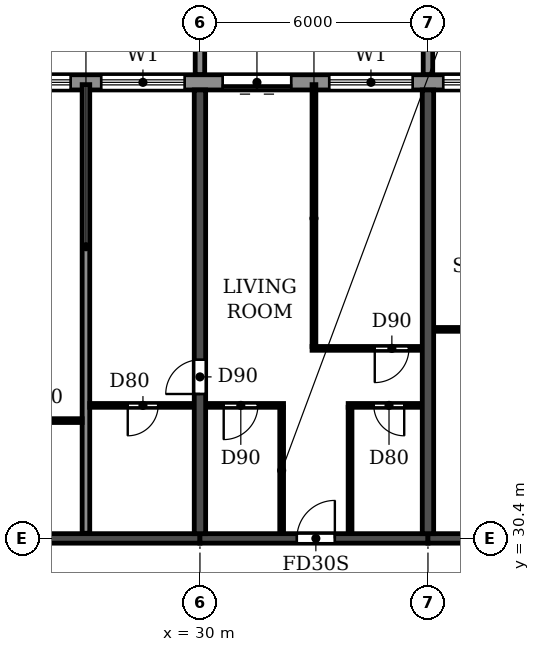
"""IFC4 building model, lengths in metres.
Left out: names, types, materials, properties, quantities, classifications, styles, units other than length and angle.
Written with IfcOpenShell. Run it as: python <this file> out.ifc"""

import sys

from ifc_helpers import new_model, si_unit, direction, frame, frame_2d, origin, place, context, subcontext, project, spatial, polyline, rectangle, outline, extrude, source, transform, mapped, element, fill, save


model = new_model("IFC4")
c1 = context("Model", 3, precision=1e-05, world=origin(), true_north=direction((0.0, 1.0)))
c2 = subcontext(c1, "Body", "Model", "MODEL_VIEW")
j1 = project(units=[si_unit("LENGTHUNIT", "METRE"), si_unit("PLANEANGLEUNIT", "RADIAN")], contexts=[c1])
p1 = place(None, origin())
s1 = spatial("IfcSite", under=j1, at=p1, CompositionType="ELEMENT")
p2 = place(p1, origin())
s2 = spatial("IfcBuilding", under=s1, at=p2, CompositionType="ELEMENT")
p3 = place(p2, frame((0.0, 0.0, 132.3)))
s3 = spatial("IfcBuildingStorey", under=s2, at=p3, CompositionType="ELEMENT", Elevation=132.3)
p4 = place(p3, frame((30.0, 30.525, 0.0), z_axis=(0.0, 0.0, 1.0), x_axis=(0.0, 1.0, 0.0)))
e1 = element("IfcWall", 1, at=p4, inside=s3, PredefinedType="SHEAR", context=c2, shape_type="SweptSolid", body=[
    extrude(rectangle(XDim=11.675, YDim=0.3, at=frame_2d((5.837, 0.0))), origin(), (0.0, 0.0, 1.0), 3.07),
])
p5 = place(p4, frame((3.675, 0.0, 0.0)))
e2 = element("IfcOpeningElement", 2, at=p5, cuts=e1, PredefinedType="OPENING", context=c2, shape_type="SweptSolid", body=[
    extrude(rectangle(XDim=0.9, YDim=2.1, at=frame_2d((0.45, 1.05))), frame((0.0, 0.16, 0.0), z_axis=(0.0, -1.0, 0.0), x_axis=(1.0, 0.0, 0.0)), (0.0, 0.0, 1.0), 0.32),
])
p6 = place(p3, frame((36.0, 30.525, 0.0), z_axis=(0.0, 0.0, 1.0), x_axis=(0.0, 1.0, 0.0)))
e3 = element("IfcWall", 3, at=p6, inside=s3, PredefinedType="SHEAR", context=c2, shape_type="SweptSolid", body=[
    extrude(rectangle(XDim=11.675, YDim=0.3, at=frame_2d((5.837, 0.0))), origin(), (0.0, 0.0, 1.0), 3.07),
])
p7 = place(p3, frame((24.0, 30.4, 0.0), z_axis=(0.0, 0.0, 1.0), x_axis=(1.0, 0.0, 0.0)))
e4 = element("IfcWall", 4, at=p7, inside=s3, PredefinedType="SHEAR", context=c2, shape_type="SweptSolid", body=[
    extrude(rectangle(XDim=6.0, YDim=0.25, at=frame_2d((3.0, 0.0))), origin(), (0.0, 0.0, 1.0), 2.47),
])
p8 = place(p3, frame((30.0, 30.4, 0.0), z_axis=(0.0, 0.0, 1.0), x_axis=(1.0, 0.0, 0.0)))
e5 = element("IfcWall", 5, at=p8, inside=s3, PredefinedType="SHEAR", context=c2, shape_type="SweptSolid", body=[
    extrude(rectangle(XDim=6.0, YDim=0.25, at=frame_2d((3.0, 0.0))), origin(), (0.0, 0.0, 1.0), 2.47),
])
p9 = place(p8, frame((2.55, 0.0, 0.0)))
e6 = element("IfcOpeningElement", 6, at=p9, cuts=e5, PredefinedType="OPENING", context=c2, shape_type="SweptSolid", body=[
    extrude(rectangle(XDim=1.0, YDim=2.1, at=frame_2d((0.5, 1.05))), frame((0.0, 0.135, 0.0), z_axis=(0.0, -1.0, 0.0), x_axis=(1.0, 0.0, 0.0)), (0.0, 0.0, 1.0), 0.27),
])
p10 = place(p3, frame((36.0, 30.4, 0.0), z_axis=(0.0, 0.0, 1.0), x_axis=(1.0, 0.0, 0.0)))
e7 = element("IfcWall", 7, at=p10, inside=s3, PredefinedType="SHEAR", context=c2, shape_type="SweptSolid", body=[
    extrude(rectangle(XDim=6.0, YDim=0.25, at=frame_2d((3.0, 0.0))), origin(), (0.0, 0.0, 1.0), 2.47),
])
p11 = place(p10, frame((2.45, 0.0, 0.0)))
e8 = element("IfcOpeningElement", 8, at=p11, cuts=e7, PredefinedType="OPENING", context=c2, shape_type="SweptSolid", body=[
    extrude(rectangle(XDim=1.0, YDim=2.1, at=frame_2d((0.5, 1.05))), frame((0.0, 0.135, 0.0), z_axis=(0.0, -1.0, 0.0), x_axis=(1.0, 0.0, 0.0)), (0.0, 0.0, 1.0), 0.27),
])
p12 = place(p3, frame((85.317, 42.4, 0.0), z_axis=(0.0, 0.0, 1.0), x_axis=(-1.0, 0.0, 0.0)))
e9 = element("IfcWall", 9, at=p12, inside=s3, PredefinedType="STANDARD", context=c2, shape_type="SweptSolid", body=[
    extrude(rectangle(XDim=68.634, YDim=0.4, at=frame_2d((34.317, 0.0))), origin(), (0.0, 0.0, 1.0), 3.07),
])
p13 = place(p12, frame((64.917, 0.0, 0.0)))
e10 = element("IfcOpeningElement", 10, at=p13, cuts=e9, PredefinedType="OPENING", context=c2, shape_type="SweptSolid", body=[
    extrude(rectangle(XDim=1.8, YDim=2.4, at=frame_2d((0.9, 1.2))), frame((0.0, 0.21, 0.0), z_axis=(0.0, -1.0, 0.0), x_axis=(1.0, 0.0, 0.0)), (0.0, 0.0, 1.0), 0.42),
])
p14 = place(p12, frame((61.717, 0.0, 0.9)))
e11 = element("IfcOpeningElement", 11, at=p14, cuts=e9, PredefinedType="OPENING", context=c2, shape_type="SweptSolid", body=[
    extrude(rectangle(XDim=2.2, YDim=1.5, at=frame_2d((1.1, 0.75))), frame((0.0, 0.21, 0.0), z_axis=(0.0, -1.0, 0.0), x_axis=(1.0, 0.0, 0.0)), (0.0, 0.0, 1.0), 0.42),
])
p15 = place(p12, frame((58.717, 0.0, 0.9)))
e12 = element("IfcOpeningElement", 12, at=p15, cuts=e9, PredefinedType="OPENING", context=c2, shape_type="SweptSolid", body=[
    extrude(rectangle(XDim=2.2, YDim=1.5, at=frame_2d((1.1, 0.75))), frame((0.0, 0.21, 0.0), z_axis=(0.0, -1.0, 0.0), x_axis=(1.0, 0.0, 0.0)), (0.0, 0.0, 1.0), 0.42),
])
p16 = place(p12, frame((55.717, 0.0, 0.9)))
e13 = element("IfcOpeningElement", 13, at=p16, cuts=e9, PredefinedType="OPENING", context=c2, shape_type="SweptSolid", body=[
    extrude(rectangle(XDim=2.2, YDim=1.5, at=frame_2d((1.1, 0.75))), frame((0.0, 0.21, 0.0), z_axis=(0.0, -1.0, 0.0), x_axis=(1.0, 0.0, 0.0)), (0.0, 0.0, 1.0), 0.42),
])
p17 = place(p12, frame((52.917, 0.0, 0.0)))
e14 = element("IfcOpeningElement", 14, at=p17, cuts=e9, PredefinedType="OPENING", context=c2, shape_type="SweptSolid", body=[
    extrude(rectangle(XDim=1.8, YDim=2.4, at=frame_2d((0.9, 1.2))), frame((0.0, 0.21, 0.0), z_axis=(0.0, -1.0, 0.0), x_axis=(1.0, 0.0, 0.0)), (0.0, 0.0, 1.0), 0.42),
])
p18 = place(p12, frame((49.717, 0.0, 0.9)))
e15 = element("IfcOpeningElement", 15, at=p18, cuts=e9, PredefinedType="OPENING", context=c2, shape_type="SweptSolid", body=[
    extrude(rectangle(XDim=2.2, YDim=1.5, at=frame_2d((1.1, 0.75))), frame((0.0, 0.21, 0.0), z_axis=(0.0, -1.0, 0.0), x_axis=(1.0, 0.0, 0.0)), (0.0, 0.0, 1.0), 0.42),
])
p19 = place(p12, frame((46.717, 0.0, 0.9)))
e16 = element("IfcOpeningElement", 16, at=p19, cuts=e9, PredefinedType="OPENING", context=c2, shape_type="SweptSolid", body=[
    extrude(rectangle(XDim=2.2, YDim=1.5, at=frame_2d((1.1, 0.75))), frame((0.0, 0.21, 0.0), z_axis=(0.0, -1.0, 0.0), x_axis=(1.0, 0.0, 0.0)), (0.0, 0.0, 1.0), 0.42),
])
p20 = place(p12, frame((43.917, 0.0, 0.0)))
e17 = element("IfcOpeningElement", 17, at=p20, cuts=e9, PredefinedType="OPENING", context=c2, shape_type="SweptSolid", body=[
    extrude(rectangle(XDim=1.8, YDim=2.4, at=frame_2d((0.9, 1.2))), frame((0.0, 0.21, 0.0), z_axis=(0.0, -1.0, 0.0), x_axis=(1.0, 0.0, 0.0)), (0.0, 0.0, 1.0), 0.42),
])
p21 = place(p12, frame((40.917, 0.0, 0.0)))
e18 = element("IfcOpeningElement", 18, at=p21, cuts=e9, PredefinedType="OPENING", context=c2, shape_type="SweptSolid", body=[
    extrude(rectangle(XDim=1.8, YDim=2.4, at=frame_2d((0.9, 1.2))), frame((0.0, 0.21, 0.0), z_axis=(0.0, -1.0, 0.0), x_axis=(1.0, 0.0, 0.0)), (0.0, 0.0, 1.0), 0.42),
])
p22 = place(p12, frame((37.717, 0.0, 0.9)))
e19 = element("IfcOpeningElement", 19, at=p22, cuts=e9, PredefinedType="OPENING", context=c2, shape_type="SweptSolid", body=[
    extrude(rectangle(XDim=2.2, YDim=1.5, at=frame_2d((1.1, 0.75))), frame((0.0, 0.21, 0.0), z_axis=(0.0, -1.0, 0.0), x_axis=(1.0, 0.0, 0.0)), (0.0, 0.0, 1.0), 0.42),
])
p23 = place(p12, frame((34.717, 0.0, 0.9)))
e20 = element("IfcOpeningElement", 20, at=p23, cuts=e9, PredefinedType="OPENING", context=c2, shape_type="SweptSolid", body=[
    extrude(rectangle(XDim=2.2, YDim=1.5, at=frame_2d((1.1, 0.75))), frame((0.0, 0.21, 0.0), z_axis=(0.0, -1.0, 0.0), x_axis=(1.0, 0.0, 0.0)), (0.0, 0.0, 1.0), 0.42),
])
p24 = place(p12, frame((31.717, 0.0, 0.9)))
e21 = element("IfcOpeningElement", 21, at=p24, cuts=e9, PredefinedType="OPENING", context=c2, shape_type="SweptSolid", body=[
    extrude(rectangle(XDim=2.2, YDim=1.5, at=frame_2d((1.1, 0.75))), frame((0.0, 0.21, 0.0), z_axis=(0.0, -1.0, 0.0), x_axis=(1.0, 0.0, 0.0)), (0.0, 0.0, 1.0), 0.42),
])
p25 = place(p12, frame((28.917, 0.0, 0.0)))
e22 = element("IfcOpeningElement", 22, at=p25, cuts=e9, PredefinedType="OPENING", context=c2, shape_type="SweptSolid", body=[
    extrude(rectangle(XDim=1.8, YDim=2.4, at=frame_2d((0.9, 1.2))), frame((0.0, 0.21, 0.0), z_axis=(0.0, -1.0, 0.0), x_axis=(1.0, 0.0, 0.0)), (0.0, 0.0, 1.0), 0.42),
])
p26 = place(p12, frame((25.717, 0.0, 0.9)))
e23 = element("IfcOpeningElement", 23, at=p26, cuts=e9, PredefinedType="OPENING", context=c2, shape_type="SweptSolid", body=[
    extrude(rectangle(XDim=2.2, YDim=1.5, at=frame_2d((1.1, 0.75))), frame((0.0, 0.21, 0.0), z_axis=(0.0, -1.0, 0.0), x_axis=(1.0, 0.0, 0.0)), (0.0, 0.0, 1.0), 0.42),
])
p27 = place(p12, frame((22.717, 0.0, 0.9)))
e24 = element("IfcOpeningElement", 24, at=p27, cuts=e9, PredefinedType="OPENING", context=c2, shape_type="SweptSolid", body=[
    extrude(rectangle(XDim=2.2, YDim=1.5, at=frame_2d((1.1, 0.75))), frame((0.0, 0.21, 0.0), z_axis=(0.0, -1.0, 0.0), x_axis=(1.0, 0.0, 0.0)), (0.0, 0.0, 1.0), 0.42),
])
p28 = place(p12, frame((19.717, 0.0, 0.9)))
e25 = element("IfcOpeningElement", 25, at=p28, cuts=e9, PredefinedType="OPENING", context=c2, shape_type="SweptSolid", body=[
    extrude(rectangle(XDim=2.2, YDim=1.5, at=frame_2d((1.1, 0.75))), frame((0.0, 0.21, 0.0), z_axis=(0.0, -1.0, 0.0), x_axis=(1.0, 0.0, 0.0)), (0.0, 0.0, 1.0), 0.42),
])
p29 = place(p12, frame((16.717, 0.0, 0.9)))
e26 = element("IfcOpeningElement", 26, at=p29, cuts=e9, PredefinedType="OPENING", context=c2, shape_type="SweptSolid", body=[
    extrude(rectangle(XDim=2.2, YDim=1.5, at=frame_2d((1.1, 0.75))), frame((0.0, 0.21, 0.0), z_axis=(0.0, -1.0, 0.0), x_axis=(1.0, 0.0, 0.0)), (0.0, 0.0, 1.0), 0.42),
])
p30 = place(p12, frame((13.917, 0.0, 0.0)))
e27 = element("IfcOpeningElement", 27, at=p30, cuts=e9, PredefinedType="OPENING", context=c2, shape_type="SweptSolid", body=[
    extrude(rectangle(XDim=1.8, YDim=2.4, at=frame_2d((0.9, 1.2))), frame((0.0, 0.21, 0.0), z_axis=(0.0, -1.0, 0.0), x_axis=(1.0, 0.0, 0.0)), (0.0, 0.0, 1.0), 0.42),
])
p31 = place(p12, frame((10.717, 0.0, 0.9)))
e28 = element("IfcOpeningElement", 28, at=p31, cuts=e9, PredefinedType="OPENING", context=c2, shape_type="SweptSolid", body=[
    extrude(rectangle(XDim=2.2, YDim=1.5, at=frame_2d((1.1, 0.75))), frame((0.0, 0.21, 0.0), z_axis=(0.0, -1.0, 0.0), x_axis=(1.0, 0.0, 0.0)), (0.0, 0.0, 1.0), 0.42),
])
p32 = place(p12, frame((7.917, 0.0, 0.0)))
e29 = element("IfcOpeningElement", 29, at=p32, cuts=e9, PredefinedType="OPENING", context=c2, shape_type="SweptSolid", body=[
    extrude(rectangle(XDim=1.8, YDim=2.4, at=frame_2d((0.9, 1.2))), frame((0.0, 0.21, 0.0), z_axis=(0.0, -1.0, 0.0), x_axis=(1.0, 0.0, 0.0)), (0.0, 0.0, 1.0), 0.42),
])
p33 = place(p12, frame((4.717, 0.0, 0.9)))
e30 = element("IfcOpeningElement", 30, at=p33, cuts=e9, PredefinedType="OPENING", context=c2, shape_type="SweptSolid", body=[
    extrude(rectangle(XDim=2.2, YDim=1.5, at=frame_2d((1.1, 0.75))), frame((0.0, 0.21, 0.0), z_axis=(0.0, -1.0, 0.0), x_axis=(1.0, 0.0, 0.0)), (0.0, 0.0, 1.0), 0.42),
])
p34 = place(p12, frame((1.917, 0.0, 0.0)))
e31 = element("IfcOpeningElement", 31, at=p34, cuts=e9, PredefinedType="OPENING", context=c2, shape_type="SweptSolid", body=[
    extrude(rectangle(XDim=1.8, YDim=2.4, at=frame_2d((0.9, 1.2))), frame((0.0, 0.21, 0.0), z_axis=(0.0, -1.0, 0.0), x_axis=(1.0, 0.0, 0.0)), (0.0, 0.0, 1.0), 0.42),
])
m1 = source(origin(), c2, "Body", "SweptSolid", [
    extrude(outline(polyline([(0.0, 0.0), (0.25, 0.0), (0.25, 3.1), (0.0, 3.1), (0.0, 0.0)])), origin(), (0.0, 0.0, 1.0), 3.1),
])
for number, where in (
    (32, (29.875, 42.6, 0.0)),
    (33, (35.875, 42.6, 0.0)),
):
    element("IfcWall", number, at=place(p3, frame(where)), inside=s3, PredefinedType="STANDARD", context=c2, shape_type="MappedRepresentation", body=[
        mapped(m1, transform((0.0, 0.0, 0.0))),
    ])
p35 = place(p3, frame((27.0, 30.535, 0.0), z_axis=(0.0, 0.0, 1.0), x_axis=(0.0, 1.0, 0.0)))
e34 = element("IfcWall", 34, at=p35, inside=s3, PredefinedType="PARTITIONING", context=c2, shape_type="SweptSolid", body=[
    extrude(rectangle(XDim=11.805, YDim=0.2, at=frame_2d((5.903, 0.0))), origin(), (0.0, 0.0, 1.0), 3.07),
])
p36 = place(p3, frame((24.16, 33.5, 0.0), z_axis=(0.0, 0.0, 1.0), x_axis=(1.0, 0.0, 0.0)))
e35 = element("IfcWall", 35, at=p36, inside=s3, PredefinedType="PARTITIONING", context=c2, shape_type="SweptSolid", body=[
    extrude(rectangle(XDim=2.74, YDim=0.1, at=frame_2d((1.37, 0.0))), origin(), (0.0, 0.0, 1.0), 3.07),
])
p37 = place(p36, frame((0.94, 0.0, 0.0)))
e36 = element("IfcOpeningElement", 36, at=p37, cuts=e35, PredefinedType="OPENING", context=c2, shape_type="SweptSolid", body=[
    extrude(rectangle(XDim=0.8, YDim=2.1, at=frame_2d((0.4, 1.05))), frame((0.0, 0.06, 0.0), z_axis=(0.0, -1.0, 0.0), x_axis=(1.0, 0.0, 0.0)), (0.0, 0.0, 1.0), 0.12),
])
p38 = place(p3, frame((27.1, 33.9, 0.0), z_axis=(0.0, 0.0, 1.0), x_axis=(1.0, 0.0, 0.0)))
e37 = element("IfcWall", 37, at=p38, inside=s3, PredefinedType="PARTITIONING", context=c2, shape_type="SweptSolid", body=[
    extrude(rectangle(XDim=2.74, YDim=0.1, at=frame_2d((1.37, 0.0))), origin(), (0.0, 0.0, 1.0), 3.07),
])
p39 = place(p38, frame((1.0, 0.0, 0.0)))
e38 = element("IfcOpeningElement", 38, at=p39, cuts=e37, PredefinedType="OPENING", context=c2, shape_type="SweptSolid", body=[
    extrude(rectangle(XDim=0.8, YDim=2.1, at=frame_2d((0.4, 1.05))), frame((0.0, 0.06, 0.0), z_axis=(0.0, -1.0, 0.0), x_axis=(1.0, 0.0, 0.0)), (0.0, 0.0, 1.0), 0.12),
])
p40 = place(p3, frame((30.16, 33.9, 0.0), z_axis=(0.0, 0.0, 1.0), x_axis=(1.0, 0.0, 0.0)))
e39 = element("IfcWall", 39, at=p40, inside=s3, PredefinedType="PARTITIONING", context=c2, shape_type="SweptSolid", body=[
    extrude(rectangle(XDim=2.04, YDim=0.1, at=frame_2d((1.02, 0.0))), origin(), (0.0, 0.0, 1.0), 3.07),
])
p41 = place(p40, frame((0.465, 0.0, 0.0)))
e40 = element("IfcOpeningElement", 40, at=p41, cuts=e39, PredefinedType="OPENING", context=c2, shape_type="SweptSolid", body=[
    extrude(rectangle(XDim=0.9, YDim=2.1, at=frame_2d((0.45, 1.05))), frame((0.0, 0.06, 0.0), z_axis=(0.0, -1.0, 0.0), x_axis=(1.0, 0.0, 0.0)), (0.0, 0.0, 1.0), 0.12),
])
p42 = place(p3, frame((33.9, 33.9, 0.0), z_axis=(0.0, 0.0, 1.0), x_axis=(1.0, 0.0, 0.0)))
e41 = element("IfcWall", 41, at=p42, inside=s3, PredefinedType="PARTITIONING", context=c2, shape_type="SweptSolid", body=[
    extrude(rectangle(XDim=1.94, YDim=0.1, at=frame_2d((0.97, 0.0))), origin(), (0.0, 0.0, 1.0), 3.07),
])
p43 = place(p42, frame((0.675, 0.0, 0.0)))
e42 = element("IfcOpeningElement", 42, at=p43, cuts=e41, PredefinedType="OPENING", context=c2, shape_type="SweptSolid", body=[
    extrude(rectangle(XDim=0.8, YDim=2.1, at=frame_2d((0.4, 1.05))), frame((0.0, 0.06, 0.0), z_axis=(0.0, -1.0, 0.0), x_axis=(1.0, 0.0, 0.0)), (0.0, 0.0, 1.0), 0.12),
])
p44 = place(p3, frame((32.95, 35.4, 0.0), z_axis=(0.0, 0.0, 1.0), x_axis=(1.0, 0.0, 0.0)))
e43 = element("IfcWall", 43, at=p44, inside=s3, PredefinedType="PARTITIONING", context=c2, shape_type="SweptSolid", body=[
    extrude(rectangle(XDim=2.89, YDim=0.1, at=frame_2d((1.445, 0.0))), origin(), (0.0, 0.0, 1.0), 3.07),
])
p45 = place(p44, frame((1.65, 0.0, 0.0)))
e44 = element("IfcOpeningElement", 44, at=p45, cuts=e43, PredefinedType="OPENING", context=c2, shape_type="SweptSolid", body=[
    extrude(rectangle(XDim=0.9, YDim=2.1, at=frame_2d((0.45, 1.05))), frame((0.0, 0.06, 0.0), z_axis=(0.0, -1.0, 0.0), x_axis=(1.0, 0.0, 0.0)), (0.0, 0.0, 1.0), 0.12),
])
p46 = place(p3, frame((36.16, 35.9, 0.0), z_axis=(0.0, 0.0, 1.0), x_axis=(1.0, 0.0, 0.0)))
e45 = element("IfcWall", 45, at=p46, inside=s3, PredefinedType="PARTITIONING", context=c2, shape_type="SweptSolid", body=[
    extrude(rectangle(XDim=1.94, YDim=0.1, at=frame_2d((0.97, 0.0))), origin(), (0.0, 0.0, 1.0), 3.07),
])
p47 = place(p3, frame((32.15, 30.535, 0.0), z_axis=(0.0, 0.0, 1.0), x_axis=(0.0, 1.0, 0.0)))
e46 = element("IfcWall", 46, at=p47, inside=s3, PredefinedType="PARTITIONING", context=c2, shape_type="SweptSolid", body=[
    extrude(rectangle(XDim=3.315, YDim=0.1, at=frame_2d((1.658, 0.0))), origin(), (0.0, 0.0, 1.0), 3.07),
])
p48 = place(p3, frame((33.0, 35.45, 0.0), z_axis=(0.0, 0.0, 1.0), x_axis=(0.0, 1.0, 0.0)))
e47 = element("IfcWall", 47, at=p48, inside=s3, PredefinedType="PARTITIONING", context=c2, shape_type="SweptSolid", body=[
    extrude(rectangle(XDim=6.89, YDim=0.1, at=frame_2d((3.445, 0.0))), origin(), (0.0, 0.0, 1.0), 3.07),
])
p49 = place(p3, frame((33.95, 30.535, 0.0), z_axis=(0.0, 0.0, 1.0), x_axis=(0.0, 1.0, 0.0)))
e48 = element("IfcWall", 48, at=p49, inside=s3, PredefinedType="PARTITIONING", context=c2, shape_type="SweptSolid", body=[
    extrude(rectangle(XDim=3.315, YDim=0.1, at=frame_2d((1.658, 0.0))), origin(), (0.0, 0.0, 1.0), 3.07),
])
p50 = place(p15, origin())
e49 = element("IfcWindow", 49, at=p50, inside=s3, PartitioningType="DOUBLE_PANEL_HORIZONTAL", PredefinedType="WINDOW", context=c2, shape_type="SweptSolid", body=[
    extrude(rectangle(XDim=2.2, YDim=1.5, at=frame_2d((1.1, 0.75))), frame((0.0, 0.03, 0.0), z_axis=(0.0, -1.0, 0.0), x_axis=(1.0, 0.0, 0.0)), (0.0, 0.0, 1.0), 0.06),
])
fill(e12, e49)
p51 = place(p16, origin())
e50 = element("IfcWindow", 50, at=p51, inside=s3, PartitioningType="DOUBLE_PANEL_HORIZONTAL", PredefinedType="WINDOW", context=c2, shape_type="SweptSolid", body=[
    extrude(rectangle(XDim=2.2, YDim=1.5, at=frame_2d((1.1, 0.75))), frame((0.0, 0.03, 0.0), z_axis=(0.0, -1.0, 0.0), x_axis=(1.0, 0.0, 0.0)), (0.0, 0.0, 1.0), 0.06),
])
fill(e13, e50)
p52 = place(p17, origin())
e51 = element("IfcDoor", 51, at=p52, inside=s3, OperationType="DOUBLE_DOOR_SLIDING", PredefinedType="DOOR", context=c2, shape_type="SweptSolid", body=[
    extrude(rectangle(XDim=1.8, YDim=2.4, at=frame_2d((0.9, 1.2))), frame((0.0, 0.025, 0.0), z_axis=(0.0, -1.0, 0.0), x_axis=(1.0, 0.0, 0.0)), (0.0, 0.0, 1.0), 0.05),
])
fill(e14, e51)
p53 = place(p18, origin())
e52 = element("IfcWindow", 52, at=p53, inside=s3, PartitioningType="DOUBLE_PANEL_HORIZONTAL", PredefinedType="WINDOW", context=c2, shape_type="SweptSolid", body=[
    extrude(rectangle(XDim=2.2, YDim=1.5, at=frame_2d((1.1, 0.75))), frame((0.0, 0.03, 0.0), z_axis=(0.0, -1.0, 0.0), x_axis=(1.0, 0.0, 0.0)), (0.0, 0.0, 1.0), 0.06),
])
fill(e15, e52)
p54 = place(p19, origin())
e53 = element("IfcWindow", 53, at=p54, inside=s3, PartitioningType="DOUBLE_PANEL_HORIZONTAL", PredefinedType="WINDOW", context=c2, shape_type="SweptSolid", body=[
    extrude(rectangle(XDim=2.2, YDim=1.5, at=frame_2d((1.1, 0.75))), frame((0.0, 0.03, 0.0), z_axis=(0.0, -1.0, 0.0), x_axis=(1.0, 0.0, 0.0)), (0.0, 0.0, 1.0), 0.06),
])
fill(e16, e53)
p55 = place(p39, frame((0.8, 0.0, 0.0), z_axis=(0.0, 0.0, 1.0), x_axis=(-1.0, 0.0, 0.0)))
e54 = element("IfcDoor", 54, at=p55, inside=s3, OperationType="SINGLE_SWING_RIGHT", PredefinedType="DOOR", context=c2, shape_type="SweptSolid", body=[
    extrude(rectangle(XDim=0.8, YDim=2.1, at=frame_2d((0.4, 1.05))), frame((0.0, 0.025, 0.0), z_axis=(0.0, -1.0, 0.0), x_axis=(1.0, 0.0, 0.0)), (0.0, 0.0, 1.0), 0.05),
])
fill(e38, e54)
p56 = place(p5, origin())
e55 = element("IfcDoor", 55, at=p56, inside=s3, OperationType="SINGLE_SWING_LEFT", PredefinedType="DOOR", context=c2, shape_type="SweptSolid", body=[
    extrude(rectangle(XDim=0.9, YDim=2.1, at=frame_2d((0.45, 1.05))), frame((0.0, 0.025, 0.0), z_axis=(0.0, -1.0, 0.0), x_axis=(1.0, 0.0, 0.0)), (0.0, 0.0, 1.0), 0.05),
])
fill(e2, e55)
p57 = place(p41, frame((0.9, 0.0, 0.0), z_axis=(0.0, 0.0, 1.0), x_axis=(-1.0, 0.0, 0.0)))
e56 = element("IfcDoor", 56, at=p57, inside=s3, OperationType="SINGLE_SWING_RIGHT", PredefinedType="DOOR", context=c2, shape_type="SweptSolid", body=[
    extrude(rectangle(XDim=0.9, YDim=2.1, at=frame_2d((0.45, 1.05))), frame((0.0, 0.025, 0.0), z_axis=(0.0, -1.0, 0.0), x_axis=(1.0, 0.0, 0.0)), (0.0, 0.0, 1.0), 0.05),
])
fill(e40, e56)
p58 = place(p9, origin())
e57 = element("IfcDoor", 57, at=p58, inside=s3, OperationType="SINGLE_SWING_RIGHT", PredefinedType="DOOR", context=c2, shape_type="SweptSolid", body=[
    extrude(rectangle(XDim=1.0, YDim=2.1, at=frame_2d((0.5, 1.05))), frame((0.0, 0.025, 0.0), z_axis=(0.0, -1.0, 0.0), x_axis=(1.0, 0.0, 0.0)), (0.0, 0.0, 1.0), 0.05),
])
fill(e6, e57)
p59 = place(p43, frame((0.8, 0.0, 0.0), z_axis=(0.0, 0.0, 1.0), x_axis=(-1.0, 0.0, 0.0)))
e58 = element("IfcDoor", 58, at=p59, inside=s3, OperationType="SINGLE_SWING_LEFT", PredefinedType="DOOR", context=c2, shape_type="SweptSolid", body=[
    extrude(rectangle(XDim=0.8, YDim=2.1, at=frame_2d((0.4, 1.05))), frame((0.0, 0.025, 0.0), z_axis=(0.0, -1.0, 0.0), x_axis=(1.0, 0.0, 0.0)), (0.0, 0.0, 1.0), 0.05),
])
fill(e42, e58)
p60 = place(p45, frame((0.9, 0.0, 0.0), z_axis=(0.0, 0.0, 1.0), x_axis=(-1.0, 0.0, 0.0)))
e59 = element("IfcDoor", 59, at=p60, inside=s3, OperationType="SINGLE_SWING_RIGHT", PredefinedType="DOOR", context=c2, shape_type="SweptSolid", body=[
    extrude(rectangle(XDim=0.9, YDim=2.1, at=frame_2d((0.45, 1.05))), frame((0.0, 0.025, 0.0), z_axis=(0.0, -1.0, 0.0), x_axis=(1.0, 0.0, 0.0)), (0.0, 0.0, 1.0), 0.05),
])
fill(e44, e59)
save(model, sys.argv[1])
